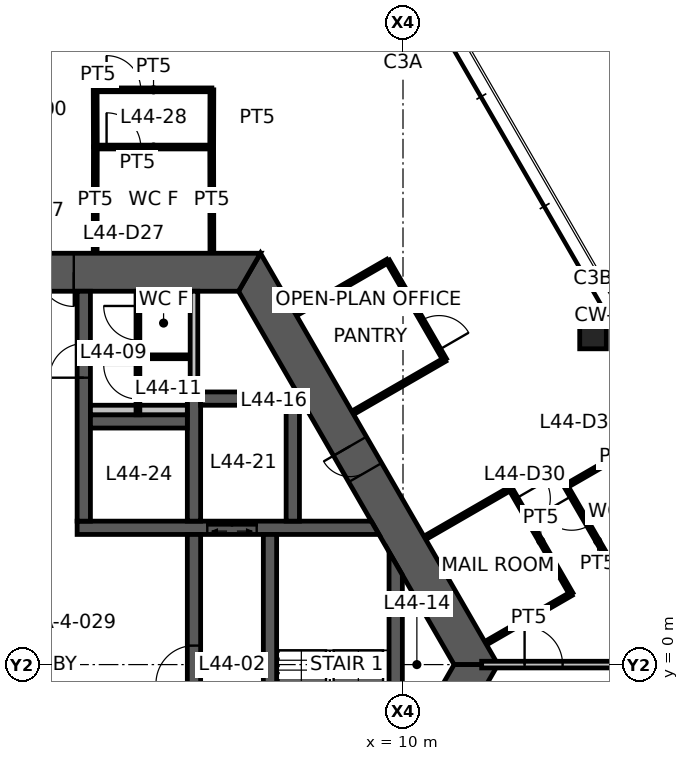
"""IFC4 building model, lengths in metres.
Left out: names, types, materials, properties, quantities, classifications, styles, units other than length and angle.
Written with IfcOpenShell. Run it as: python <this file> out.ifc"""

import sys

from ifc_helpers import new_model, si_unit, direction, frame, frame_2d, origin, origin_2d, place, context, subcontext, project, spatial, polyline, rectangle, hollow_rectangle, outline, extrude, element, fill, save


model = new_model("IFC4")
c1 = context("Model", 3, precision=1e-05, world=origin(), true_north=direction((0.0, 1.0)))
c2 = subcontext(c1, "Body", "Model", "MODEL_VIEW")
j1 = project(units=[si_unit("LENGTHUNIT", "METRE"), si_unit("PLANEANGLEUNIT", "RADIAN")], contexts=[c1])
p1 = place(None, origin())
s1 = spatial("IfcSite", under=j1, at=p1, CompositionType="ELEMENT")
p2 = place(p1, origin())
s2 = spatial("IfcBuilding", under=s1, at=p2, CompositionType="ELEMENT")
p3 = place(p2, frame((0.0, 0.0, 176.0)))
s3 = spatial("IfcBuildingStorey", under=s2, at=p3, CompositionType="ELEMENT", Elevation=176.0)
p4 = place(p3, frame((15.0, 8.66, 0.0), z_axis=(0.0, 0.0, 1.0), x_axis=(1.0, 0.0, 0.0)))
e1 = element("IfcColumn", 1, at=p4, inside=s3, PredefinedType="COLUMN", context=c2, shape_type="SweptSolid", body=[
    extrude(hollow_rectangle(XDim=0.7, YDim=0.7, WallThickness=0.036, at=origin_2d()), origin(), (0.0, 0.0, 1.0), 3.9),
])
p5 = place(p3, frame((11.922, 0.0, 0.0), z_axis=(0.0, 0.0, 1.0), x_axis=(-0.500004296715, 0.866022923061, 0.0)))
e2 = element("IfcWall", 2, at=p5, inside=s3, PredefinedType="SHEAR", context=c2, shape_type="SweptSolid", body=[
    extrude(outline(polyline([(-0.289, -0.5), (5.835, -0.5), (6.635, -0.5), (12.211, -0.5), (11.634, 0.5), (6.635, 0.5), (5.835, 0.5), (0.289, 0.5), (-0.289, -0.5)])), origin(), (0.0, 0.0, 1.0), 3.9),
])
p6 = place(p5, frame((5.835, 0.0, 0.0)))
e3 = element("IfcOpeningElement", 3, at=p6, cuts=e2, PredefinedType="OPENING", context=c2, shape_type="SweptSolid", body=[
    extrude(rectangle(XDim=0.8, YDim=2.1, at=frame_2d((0.4, 1.05))), frame((0.0, 0.51, 0.0), z_axis=(0.0, -1.0, 0.0), x_axis=(1.0, 0.0, 0.0)), (0.0, 0.0, 1.0), 1.02),
])
p7 = place(p3, frame((5.961, 10.325, 0.0), z_axis=(0.0, 0.0, 1.0), x_axis=(-1.0, 0.0, 0.0)))
e4 = element("IfcWall", 4, at=p7, inside=s3, PredefinedType="SHEAR", context=c2, shape_type="SweptSolid", body=[
    extrude(outline(polyline([(-0.289, -0.5), (4.624, -0.5), (5.523, -0.5), (6.399, -0.5), (7.299, -0.5), (12.211, -0.5), (11.634, 0.5), (7.299, 0.5), (6.399, 0.5), (5.523, 0.5), (4.624, 0.5), (0.289, 0.5), (-0.289, -0.5)])), origin(), (0.0, 0.0, 1.0), 3.9),
])
p8 = place(p7, frame((6.399, 0.0, 0.0)))
e5 = element("IfcOpeningElement", 5, at=p8, cuts=e4, PredefinedType="OPENING", context=c2, shape_type="SweptSolid", body=[
    extrude(rectangle(XDim=0.9, YDim=2.1, at=frame_2d((0.45, 1.05))), frame((0.0, 0.51, 0.0), z_axis=(0.0, -1.0, 0.0), x_axis=(1.0, 0.0, 0.0)), (0.0, 0.0, 1.0), 1.02),
])
p9 = place(p7, frame((4.624, 0.0, 0.0)))
e6 = element("IfcOpeningElement", 6, at=p9, cuts=e4, PredefinedType="OPENING", context=c2, shape_type="SweptSolid", body=[
    extrude(rectangle(XDim=0.9, YDim=2.1, at=frame_2d((0.45, 1.05))), frame((0.0, 0.51, 0.0), z_axis=(0.0, -1.0, 0.0), x_axis=(1.0, 0.0, 0.0)), (0.0, 0.0, 1.0), 1.02),
])
p10 = place(p3, frame((5.961, -10.325, 0.0), z_axis=(0.0, 0.0, 1.0), x_axis=(0.500004296715, 0.866022923061, 0.0)))
e7 = element("IfcWall", 7, at=p10, inside=s3, PredefinedType="SHEAR", context=c2, shape_type="SweptSolid", body=[
    extrude(outline(polyline([(-0.289, -0.5), (4.594, -0.5), (5.394, -0.5), (12.211, -0.5), (11.634, 0.5), (5.394, 0.5), (4.594, 0.5), (0.289, 0.5), (-0.289, -0.5)])), origin(), (0.0, 0.0, 1.0), 3.9),
])
p11 = place(p10, frame((4.594, 0.0, 0.0)))
e8 = element("IfcOpeningElement", 8, at=p11, cuts=e7, PredefinedType="OPENING", context=c2, shape_type="SweptSolid", body=[
    extrude(rectangle(XDim=0.8, YDim=2.1, at=frame_2d((0.4, 1.05))), frame((0.0, 0.51, 0.0), z_axis=(0.0, -1.0, 0.0), x_axis=(1.0, 0.0, 0.0)), (0.0, 0.0, 1.0), 1.02),
])
p12 = place(p3, frame((1.425, 3.6, 0.0), z_axis=(0.0, 0.0, 1.0), x_axis=(1.0, 0.0, 0.0)))
e9 = element("IfcWall", 9, at=p12, inside=s3, PredefinedType="SHEAR", context=c2, shape_type="SweptSolid", body=[
    extrude(outline(polyline([(0.0, -0.175), (3.425, -0.175), (4.725, -0.175), (7.942, -0.175), (7.74, 0.175), (4.725, 0.175), (3.425, 0.175), (0.0, 0.175), (0.0, -0.175)])), origin(), (0.0, 0.0, 1.0), 3.9),
])
p13 = place(p12, frame((3.425, 0.0, 0.0)))
e10 = element("IfcOpeningElement", 10, at=p13, cuts=e9, PredefinedType="OPENING", context=c2, shape_type="SweptSolid", body=[
    extrude(rectangle(XDim=1.3, YDim=2.1, at=frame_2d((0.65, 1.05))), frame((0.0, 0.185, 0.0), z_axis=(0.0, -1.0, 0.0), x_axis=(1.0, 0.0, 0.0)), (0.0, 0.0, 1.0), 0.37),
])
p14 = place(p3, frame((1.6, 3.775, 0.0), z_axis=(0.0, 0.0, 1.0), x_axis=(0.0, 1.0, 0.0)))
e11 = element("IfcWall", 11, at=p14, inside=s3, PredefinedType="SHEAR", context=c2, shape_type="SweptSolid", body=[
    extrude(rectangle(XDim=6.05, YDim=0.35, at=frame_2d((3.025, 0.0))), origin(), (0.0, 0.0, 1.0), 3.9),
])
p15 = place(p14, frame((3.775, 0.0, 0.0)))
e12 = element("IfcOpeningElement", 12, at=p15, cuts=e11, PredefinedType="OPENING", context=c2, shape_type="SweptSolid", body=[
    extrude(rectangle(XDim=0.9, YDim=2.1, at=frame_2d((0.45, 1.05))), frame((0.0, 0.185, 0.0), z_axis=(0.0, -1.0, 0.0), x_axis=(1.0, 0.0, 0.0)), (0.0, 0.0, 1.0), 0.37),
])
p16 = place(p3, frame((4.5, -3.425, 0.0), z_axis=(0.0, 0.0, 1.0), x_axis=(0.0, 1.0, 0.0)))
e13 = element("IfcWall", 13, at=p16, inside=s3, PredefinedType="SHEAR", context=c2, shape_type="SweptSolid", body=[
    extrude(rectangle(XDim=6.85, YDim=0.35, at=frame_2d((3.425, 0.0))), origin(), (0.0, 0.0, 1.0), 3.9),
])
p17 = place(p16, frame((2.925, 0.0, 0.0)))
e14 = element("IfcOpeningElement", 14, at=p17, cuts=e13, PredefinedType="OPENING", context=c2, shape_type="SweptSolid", body=[
    extrude(rectangle(XDim=1.0, YDim=2.1, at=frame_2d((0.5, 1.05))), frame((0.0, 0.185, 0.0), z_axis=(0.0, -1.0, 0.0), x_axis=(1.0, 0.0, 0.0)), (0.0, 0.0, 1.0), 0.37),
])
p18 = place(p3, frame((6.5, -3.425, 0.0), z_axis=(0.0, 0.0, 1.0), x_axis=(0.0, 1.0, 0.0)))
e15 = element("IfcWall", 15, at=p18, inside=s3, PredefinedType="SHEAR", context=c2, shape_type="SweptSolid", body=[
    extrude(rectangle(XDim=6.85, YDim=0.35, at=frame_2d((3.425, 0.0))), origin(), (0.0, 0.0, 1.0), 3.9),
])
p19 = place(p18, frame((0.1, 0.0, 0.0)))
e16 = element("IfcOpeningElement", 16, at=p19, cuts=e15, PredefinedType="OPENING", context=c2, shape_type="SweptSolid", body=[
    extrude(rectangle(XDim=1.0, YDim=2.1, at=frame_2d((0.5, 1.05))), frame((0.0, 0.185, 0.0), z_axis=(0.0, -1.0, 0.0), x_axis=(1.0, 0.0, 0.0)), (0.0, 0.0, 1.0), 0.37),
])
p20 = place(p3, frame((4.5, 3.775, 0.0), z_axis=(0.0, 0.0, 1.0), x_axis=(0.0, 1.0, 0.0)))
e17 = element("IfcWall", 17, at=p20, inside=s3, PredefinedType="SHEAR", context=c2, shape_type="SweptSolid", body=[
    extrude(rectangle(XDim=3.4, YDim=0.35, at=frame_2d((1.7, 0.0))), origin(), (0.0, 0.0, 1.0), 3.9),
])
p21 = place(p3, frame((1.775, 6.4, 0.0), z_axis=(0.0, 0.0, 1.0), x_axis=(1.0, 0.0, 0.0)))
e18 = element("IfcWall", 18, at=p21, inside=s3, PredefinedType="SHEAR", context=c2, shape_type="SweptSolid", body=[
    extrude(rectangle(XDim=2.55, YDim=0.35, at=frame_2d((1.275, 0.0))), origin(), (0.0, 0.0, 1.0), 3.9),
])
p22 = place(p3, frame((4.675, 7.0, 0.0), z_axis=(0.0, 0.0, 1.0), x_axis=(1.0, 0.0, 0.0)))
e19 = element("IfcWall", 19, at=p22, inside=s3, PredefinedType="SHEAR", context=c2, shape_type="SweptSolid", body=[
    extrude(rectangle(XDim=2.25, YDim=0.35, at=frame_2d((1.125, 0.0))), origin(), (0.0, 0.0, 1.0), 3.9),
])
p23 = place(p3, frame((7.1, 3.775, 0.0), z_axis=(0.0, 0.0, 1.0), x_axis=(0.0, 1.0, 0.0)))
e20 = element("IfcWall", 20, at=p23, inside=s3, PredefinedType="SHEAR", context=c2, shape_type="SweptSolid", body=[
    extrude(outline(polyline([(0.0, -0.175), (3.274, -0.175), (3.4, 0.0), (3.4, 0.175), (0.0, 0.175), (0.0, -0.175)])), origin(), (0.0, 0.0, 1.0), 3.9),
])
p24 = place(p3, frame((9.808, -2.662, 0.0), z_axis=(0.0, 0.0, 1.0), x_axis=(0.0, 1.0, 0.0)))
e21 = element("IfcWall", 21, at=p24, inside=s3, PredefinedType="SHEAR", context=c2, shape_type="SweptSolid", body=[
    extrude(outline(polyline([(0.303, -0.175), (5.021, -0.175), (5.628, 0.175), (-0.303, 0.175), (0.303, -0.175)])), origin(), (0.0, 0.0, 1.0), 3.9),
])
p25 = place(p3, frame((4.5, 7.175, 0.0), z_axis=(0.0, 0.0, 1.0), x_axis=(0.0, 1.0, 0.0)))
e22 = element("IfcWall", 22, at=p25, inside=s3, PredefinedType="STANDARD", context=c2, shape_type="SweptSolid", body=[
    extrude(rectangle(XDim=2.65, YDim=0.2, at=frame_2d((1.325, 0.0))), origin(), (0.0, 0.0, 1.0), 3.9),
])
p26 = place(p3, frame((1.775, 6.7, 0.0), z_axis=(0.0, 0.0, 1.0), x_axis=(1.0, 0.0, 0.0)))
e23 = element("IfcWall", 23, at=p26, inside=s3, PredefinedType="PLUMBINGWALL", context=c2, shape_type="SweptSolid", body=[
    extrude(rectangle(XDim=2.55, YDim=0.25, at=frame_2d((1.275, 0.0))), origin(), (0.0, 0.0, 1.0), 3.9),
])
p27 = place(p3, frame((3.025, 6.575, 0.0), z_axis=(0.0, 0.0, 1.0), x_axis=(0.0, 1.0, 0.0)))
e24 = element("IfcWall", 24, at=p27, inside=s3, PredefinedType="PARTITIONING", context=c2, shape_type="SweptSolid", body=[
    extrude(rectangle(XDim=3.25, YDim=0.1, at=frame_2d((1.625, 0.0))), origin(), (0.0, 0.0, 1.0), 2.95),
])
p28 = place(p27, frame((1.962, 0.0, 0.0)))
e25 = element("IfcOpeningElement", 25, at=p28, cuts=e24, PredefinedType="OPENING", context=c2, shape_type="SweptSolid", body=[
    extrude(rectangle(XDim=0.9, YDim=2.1, at=frame_2d((0.45, 1.05))), frame((0.0, 0.06, 0.0), z_axis=(0.0, -1.0, 0.0), x_axis=(1.0, 0.0, 0.0)), (0.0, 0.0, 1.0), 0.12),
])
p29 = place(p27, frame((0.413, 0.0, 0.0)))
e26 = element("IfcOpeningElement", 26, at=p29, cuts=e24, PredefinedType="OPENING", context=c2, shape_type="SweptSolid", body=[
    extrude(rectangle(XDim=0.9, YDim=2.1, at=frame_2d((0.45, 1.05))), frame((0.0, 0.06, 0.0), z_axis=(0.0, -1.0, 0.0), x_axis=(1.0, 0.0, 0.0)), (0.0, 0.0, 1.0), 0.12),
])
p30 = place(p3, frame((3.075, 8.1, 0.0), z_axis=(0.0, 0.0, 1.0), x_axis=(1.0, 0.0, 0.0)))
e27 = element("IfcWall", 27, at=p30, inside=s3, PredefinedType="PARTITIONING", context=c2, shape_type="SweptSolid", body=[
    extrude(rectangle(XDim=1.25, YDim=0.1, at=frame_2d((0.625, 0.0))), origin(), (0.0, 0.0, 1.0), 2.95),
])
p31 = place(p3, frame((12.07, 0.0, 0.0), z_axis=(0.0, 0.0, 1.0), x_axis=(1.0, 0.0, 0.0)))
e28 = element("IfcWall", 28, at=p31, inside=s3, PredefinedType="PARTITIONING", context=c2, shape_type="SweptSolid", body=[
    extrude(rectangle(XDim=7.93, YDim=0.175, at=frame_2d((3.965, 0.0))), origin(), (0.0, 0.0, 1.0), 3.05),
])
p32 = place(p31, frame((1.13, 0.0, 0.0)))
e29 = element("IfcOpeningElement", 29, at=p32, cuts=e28, PredefinedType="OPENING", context=c2, shape_type="SweptSolid", body=[
    extrude(rectangle(XDim=1.0, YDim=2.1, at=frame_2d((0.5, 1.05))), frame((0.0, 0.098, 0.0), z_axis=(0.0, -1.0, 0.0), x_axis=(1.0, 0.0, 0.0)), (0.0, 0.0, 1.0), 0.195),
])
p33 = place(p3, frame((1.9, 13.62, 0.0), z_axis=(0.0, 0.0, 1.0), x_axis=(1.0, 0.0, 0.0)))
e30 = element("IfcWall", 30, at=p33, inside=s3, PredefinedType="PARTITIONING", context=c2, shape_type="SweptSolid", body=[
    extrude(rectangle(XDim=3.071, YDim=0.1, at=frame_2d((1.536, 0.0))), origin(), (0.0, 0.0, 1.0), 2.95),
])
p34 = place(p33, frame((0.3, 0.0, 0.0)))
e31 = element("IfcOpeningElement", 31, at=p34, cuts=e30, PredefinedType="OPENING", context=c2, shape_type="SweptSolid", body=[
    extrude(rectangle(XDim=0.9, YDim=2.1, at=frame_2d((0.45, 1.05))), frame((0.0, 0.06, 0.0), z_axis=(0.0, -1.0, 0.0), x_axis=(1.0, 0.0, 0.0)), (0.0, 0.0, 1.0), 0.12),
])
for number, where, z_axis, x_axis in (
    (32, (1.9, 10.845, 0.0), (0.0, 0.0, 1.0), (0.002, 1.0, 0.0)),
    (33, (4.966, 13.625, 0.0), (0.0, 0.0, 1.0), (0.002, -1.0, 0.0)),
):
    element("IfcWall", number, at=place(p3, frame(where, z_axis=z_axis, x_axis=x_axis)), inside=s3, PredefinedType="PARTITIONING", context=c2, shape_type="SweptSolid", body=[
        extrude(rectangle(XDim=2.78, YDim=0.1, at=frame_2d((1.39, 0.0))), origin(), (0.0, 0.0, 1.0), 2.95),
    ])
p35 = place(p3, frame((1.9, 15.125, 0.0), z_axis=(0.0, 0.0, 1.0), x_axis=(1.0, 0.0, 0.0)))
e34 = element("IfcWall", 34, at=p35, inside=s3, PredefinedType="PARTITIONING", context=c2, shape_type="SweptSolid", body=[
    extrude(rectangle(XDim=3.071, YDim=0.1, at=frame_2d((1.536, 0.0))), origin(), (0.0, 0.0, 1.0), 2.95),
])
p36 = place(p35, frame((0.3, 0.0, 0.0)))
e35 = element("IfcOpeningElement", 35, at=p36, cuts=e34, PredefinedType="OPENING", context=c2, shape_type="SweptSolid", body=[
    extrude(rectangle(XDim=0.9, YDim=2.1, at=frame_2d((0.45, 1.05))), frame((0.0, 0.06, 0.0), z_axis=(0.0, -1.0, 0.0), x_axis=(1.0, 0.0, 0.0)), (0.0, 0.0, 1.0), 0.12),
])
for number, where, z_axis, x_axis in (
    (36, (1.905, 13.625, 0.0), (0.0, 0.0, 1.0), (-0.003, 1.0, 0.0)),
    (37, (4.971, 15.125, 0.0), (0.0, 0.0, 1.0), (-0.003, -1.0, 0.0)),
):
    element("IfcWall", number, at=place(p3, frame(where, z_axis=z_axis, x_axis=x_axis)), inside=s3, PredefinedType="PARTITIONING", context=c2, shape_type="SweptSolid", body=[
        extrude(rectangle(XDim=1.5, YDim=0.1, at=frame_2d((0.75, 0.0))), origin(), (0.0, 0.0, 1.0), 2.95),
    ])
p37 = place(p3, frame((7.192, 9.233, 0.0), z_axis=(0.0, 0.0, 1.0), x_axis=(0.866018876994, 0.500011304563, 0.0)))
e38 = element("IfcWall", 38, at=p37, inside=s3, PredefinedType="PARTITIONING", context=c2, shape_type="SweptSolid", body=[
    extrude(rectangle(XDim=2.78, YDim=0.1, at=frame_2d((1.39, 0.0))), origin(), (0.0, 0.0, 1.0), 2.95),
])
p38 = place(p3, frame((9.6, 10.623, 0.0), z_axis=(0.0, 0.0, 1.0), x_axis=(0.499990139034, -0.866031096941, 0.0)))
e39 = element("IfcWall", 39, at=p38, inside=s3, PredefinedType="PARTITIONING", context=c2, shape_type="SweptSolid", body=[
    extrude(rectangle(XDim=3.0, YDim=0.1, at=frame_2d((1.5, 0.0))), origin(), (0.0, 0.0, 1.0), 2.95),
])
p39 = place(p38, frame((1.8, 0.0, 0.0)))
e40 = element("IfcOpeningElement", 40, at=p39, cuts=e39, PredefinedType="OPENING", context=c2, shape_type="SweptSolid", body=[
    extrude(rectangle(XDim=0.9, YDim=2.1, at=frame_2d((0.45, 1.05))), frame((0.0, 0.06, 0.0), z_axis=(0.0, -1.0, 0.0), x_axis=(1.0, 0.0, 0.0)), (0.0, 0.0, 1.0), 0.12),
])
p40 = place(p3, frame((11.1, 8.025, 0.0), z_axis=(0.0, 0.0, 1.0), x_axis=(-0.866056901187, -0.49994544093, 0.0)))
e41 = element("IfcWall", 41, at=p40, inside=s3, PredefinedType="PARTITIONING", context=c2, shape_type="SweptSolid", body=[
    extrude(rectangle(XDim=2.78, YDim=0.1, at=frame_2d((1.39, 0.0))), origin(), (0.0, 0.0, 1.0), 2.95),
])
p41 = place(p3, frame((10.592, 3.344, 0.0), z_axis=(0.0, 0.0, 1.0), x_axis=(0.866021702275, 0.500006411147, 0.0)))
e42 = element("IfcWall", 42, at=p41, inside=s3, PredefinedType="PARTITIONING", context=c2, shape_type="SweptSolid", body=[
    extrude(rectangle(XDim=2.58, YDim=0.1, at=frame_2d((1.29, 0.0))), origin(), (0.0, 0.0, 1.0), 2.95),
])
p42 = place(p3, frame((12.826, 4.634, 0.0), z_axis=(0.0, 0.0, 1.0), x_axis=(0.500028443584, -0.866008981251, 0.0)))
e43 = element("IfcWall", 43, at=p42, inside=s3, PredefinedType="PARTITIONING", context=c2, shape_type="SweptSolid", body=[
    extrude(rectangle(XDim=3.2, YDim=0.1, at=frame_2d((1.6, 0.0))), origin(), (0.0, 0.0, 1.0), 2.95),
])
p43 = place(p42, frame((0.3, 0.0, 0.0)))
e44 = element("IfcOpeningElement", 44, at=p43, cuts=e43, PredefinedType="OPENING", context=c2, shape_type="SweptSolid", body=[
    extrude(rectangle(XDim=0.9, YDim=2.1, at=frame_2d((0.45, 1.05))), frame((0.0, 0.06, 0.0), z_axis=(0.0, -1.0, 0.0), x_axis=(1.0, 0.0, 0.0)), (0.0, 0.0, 1.0), 0.12),
])
p44 = place(p3, frame((14.427, 1.863, 0.0), z_axis=(0.0, 0.0, 1.0), x_axis=(-0.866045356598, -0.49996543912, 0.0)))
e45 = element("IfcWall", 45, at=p44, inside=s3, PredefinedType="PARTITIONING", context=c2, shape_type="SweptSolid", body=[
    extrude(rectangle(XDim=2.58, YDim=0.1, at=frame_2d((1.29, 0.0))), origin(), (0.0, 0.0, 1.0), 2.95),
])
p45 = place(p3, frame((14.287, 4.695, 0.0), z_axis=(0.0, 0.0, 1.0), x_axis=(0.866023220135, 0.500003782172, 0.0)))
e46 = element("IfcWall", 46, at=p45, inside=s3, PredefinedType="PARTITIONING", context=c2, shape_type="SweptSolid", body=[
    extrude(rectangle(XDim=3.105, YDim=0.1, at=frame_2d((1.552, 0.0))), origin(), (0.0, 0.0, 1.0), 2.95),
])
p46 = place(p3, frame((15.956, 1.813, 0.0), z_axis=(0.0, 0.0, 1.0), x_axis=(-0.501111387448, 0.865382792393, 0.0)))
e47 = element("IfcWall", 47, at=p46, inside=s3, PredefinedType="PARTITIONING", context=c2, shape_type="SweptSolid", body=[
    extrude(rectangle(XDim=3.331, YDim=0.1, at=frame_2d((1.666, 0.0))), origin(), (0.0, 0.0, 1.0), 2.95),
])
p47 = place(p46, frame((2.131, 0.0, 0.0)))
e48 = element("IfcOpeningElement", 48, at=p47, cuts=e47, PredefinedType="OPENING", context=c2, shape_type="SweptSolid", body=[
    extrude(rectangle(XDim=0.9, YDim=2.1, at=frame_2d((0.45, 1.05))), frame((0.0, 0.06, 0.0), z_axis=(0.0, -1.0, 0.0), x_axis=(1.0, 0.0, 0.0)), (0.0, 0.0, 1.0), 0.12),
])
p48 = place(p9, origin())
e49 = element("IfcDoor", 49, at=p48, inside=s3, OperationType="SINGLE_SWING_LEFT", PredefinedType="DOOR", context=c2, shape_type="SweptSolid", body=[
    extrude(rectangle(XDim=0.9, YDim=2.1, at=frame_2d((0.45, 1.05))), frame((0.0, 0.025, 0.0), z_axis=(0.0, -1.0, 0.0), x_axis=(1.0, 0.0, 0.0)), (0.0, 0.0, 1.0), 0.05),
])
fill(e6, e49)
p49 = place(p6, origin())
e50 = element("IfcDoor", 50, at=p49, inside=s3, OperationType="SINGLE_SWING_RIGHT", PredefinedType="DOOR", context=c2, shape_type="SweptSolid", body=[
    extrude(rectangle(XDim=0.8, YDim=2.1, at=frame_2d((0.4, 1.05))), frame((0.0, 0.025, 0.0), z_axis=(0.0, -1.0, 0.0), x_axis=(1.0, 0.0, 0.0)), (0.0, 0.0, 1.0), 0.05),
])
fill(e3, e50)
p50 = place(p17, origin())
e51 = element("IfcDoor", 51, at=p50, inside=s3, OperationType="SINGLE_SWING_LEFT", PredefinedType="DOOR", context=c2, shape_type="SweptSolid", body=[
    extrude(rectangle(XDim=1.0, YDim=2.1, at=frame_2d((0.5, 1.05))), frame((0.0, 0.025, 0.0), z_axis=(0.0, -1.0, 0.0), x_axis=(1.0, 0.0, 0.0)), (0.0, 0.0, 1.0), 0.05),
])
fill(e14, e51)
p51 = place(p15, origin())
e52 = element("IfcDoor", 52, at=p51, inside=s3, OperationType="SINGLE_SWING_LEFT", PredefinedType="DOOR", context=c2, shape_type="SweptSolid", body=[
    extrude(rectangle(XDim=0.9, YDim=2.1, at=frame_2d((0.45, 1.05))), frame((0.0, 0.025, 0.0), z_axis=(0.0, -1.0, 0.0), x_axis=(1.0, 0.0, 0.0)), (0.0, 0.0, 1.0), 0.05),
])
fill(e12, e52)
p52 = place(p28, origin())
e53 = element("IfcDoor", 53, at=p52, inside=s3, OperationType="SINGLE_SWING_RIGHT", PredefinedType="DOOR", context=c2, shape_type="SweptSolid", body=[
    extrude(rectangle(XDim=0.9, YDim=2.1, at=frame_2d((0.45, 1.05))), frame((0.0, 0.025, 0.0), z_axis=(0.0, -1.0, 0.0), x_axis=(1.0, 0.0, 0.0)), (0.0, 0.0, 1.0), 0.05),
])
fill(e25, e53)
p53 = place(p29, origin())
e54 = element("IfcDoor", 54, at=p53, inside=s3, OperationType="SINGLE_SWING_RIGHT", PredefinedType="DOOR", context=c2, shape_type="SweptSolid", body=[
    extrude(rectangle(XDim=0.9, YDim=2.1, at=frame_2d((0.45, 1.05))), frame((0.0, 0.025, 0.0), z_axis=(0.0, -1.0, 0.0), x_axis=(1.0, 0.0, 0.0)), (0.0, 0.0, 1.0), 0.05),
])
fill(e26, e54)
p54 = place(p32, origin())
e55 = element("IfcDoor", 55, at=p54, inside=s3, OperationType="SINGLE_SWING_LEFT", PredefinedType="DOOR", context=c2, shape_type="SweptSolid", body=[
    extrude(rectangle(XDim=1.0, YDim=2.1, at=frame_2d((0.5, 1.05))), frame((0.0, 0.025, 0.0), z_axis=(0.0, -1.0, 0.0), x_axis=(1.0, 0.0, 0.0)), (0.0, 0.0, 1.0), 0.05),
])
fill(e29, e55)
p55 = place(p34, origin())
e56 = element("IfcDoor", 56, at=p55, inside=s3, OperationType="SINGLE_SWING_LEFT", PredefinedType="DOOR", context=c2, shape_type="SweptSolid", body=[
    extrude(rectangle(XDim=0.9, YDim=2.1, at=frame_2d((0.45, 1.05))), frame((0.0, 0.025, 0.0), z_axis=(0.0, -1.0, 0.0), x_axis=(1.0, 0.0, 0.0)), (0.0, 0.0, 1.0), 0.05),
])
fill(e31, e56)
p56 = place(p36, origin())
e57 = element("IfcDoor", 57, at=p56, inside=s3, OperationType="SINGLE_SWING_LEFT", PredefinedType="DOOR", context=c2, shape_type="SweptSolid", body=[
    extrude(rectangle(XDim=0.9, YDim=2.1, at=frame_2d((0.45, 1.05))), frame((0.0, 0.025, 0.0), z_axis=(0.0, -1.0, 0.0), x_axis=(1.0, 0.0, 0.0)), (0.0, 0.0, 1.0), 0.05),
])
fill(e35, e57)
p57 = place(p39, origin())
e58 = element("IfcDoor", 58, at=p57, inside=s3, OperationType="SINGLE_SWING_RIGHT", PredefinedType="DOOR", context=c2, shape_type="SweptSolid", body=[
    extrude(rectangle(XDim=0.9, YDim=2.1, at=frame_2d((0.45, 1.05))), frame((0.0, 0.025, 0.0), z_axis=(0.0, -1.0, 0.0), x_axis=(1.0, 0.0, 0.0)), (0.0, 0.0, 1.0), 0.05),
])
fill(e40, e58)
p58 = place(p43, origin())
e59 = element("IfcDoor", 59, at=p58, inside=s3, OperationType="SINGLE_SWING_LEFT", PredefinedType="DOOR", context=c2, shape_type="SweptSolid", body=[
    extrude(rectangle(XDim=0.9, YDim=2.1, at=frame_2d((0.45, 1.05))), frame((0.0, 0.025, 0.0), z_axis=(0.0, -1.0, 0.0), x_axis=(1.0, 0.0, 0.0)), (0.0, 0.0, 1.0), 0.05),
])
fill(e44, e59)
p59 = place(p47, origin())
e60 = element("IfcDoor", 60, at=p59, inside=s3, OperationType="SINGLE_SWING_RIGHT", PredefinedType="DOOR", context=c2, shape_type="SweptSolid", body=[
    extrude(rectangle(XDim=0.9, YDim=2.1, at=frame_2d((0.45, 1.05))), frame((0.0, 0.025, 0.0), z_axis=(0.0, -1.0, 0.0), x_axis=(1.0, 0.0, 0.0)), (0.0, 0.0, 1.0), 0.05),
])
fill(e48, e60)
p60 = place(p13, origin())
e61 = element("IfcDoor", 61, at=p60, inside=s3, OperationType="DOUBLE_DOOR_SLIDING", PredefinedType="DOOR", context=c2, shape_type="SweptSolid", body=[
    extrude(rectangle(XDim=1.3, YDim=2.1, at=frame_2d((0.65, 1.05))), frame((0.0, 0.025, 0.0), z_axis=(0.0, -1.0, 0.0), x_axis=(1.0, 0.0, 0.0)), (0.0, 0.0, 1.0), 0.05),
])
fill(e10, e61)
save(model, sys.argv[1])
